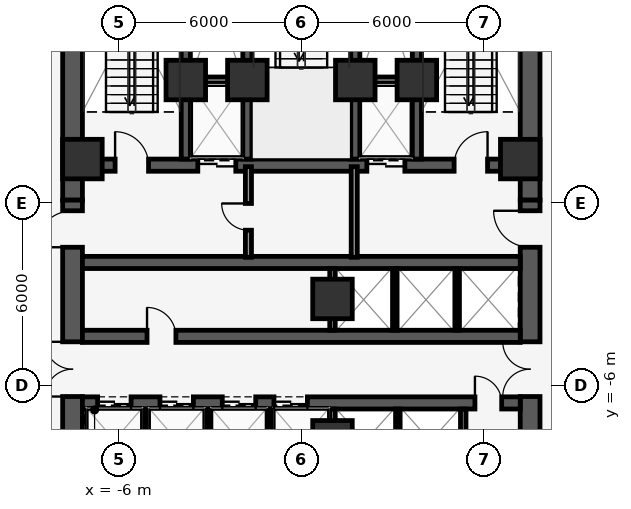
"""IFC4 building model, lengths in metres.
Left out: names, types, materials, properties, quantities, classifications, styles, units other than length and angle.
Written with IfcOpenShell. Run it as: python <this file> out.ifc"""

import sys

from ifc_helpers import new_model, si_unit, direction, frame, frame_2d, origin, origin_2d, place, context, subcontext, project, spatial, rectangle, extrude, element, fill, save


model = new_model("IFC4")
c1 = context("Model", 3, precision=1e-05, world=origin(), true_north=direction((0.0, 1.0)))
c2 = subcontext(c1, "Body", "Model", "MODEL_VIEW")
j1 = project(units=[si_unit("LENGTHUNIT", "METRE"), si_unit("PLANEANGLEUNIT", "RADIAN")], contexts=[c1])
p1 = place(None, origin())
s1 = spatial("IfcSite", under=j1, at=p1, CompositionType="ELEMENT")
p2 = place(p1, origin())
s2 = spatial("IfcBuilding", under=s1, at=p2, CompositionType="ELEMENT")
p3 = place(p2, frame((0.0, 0.0, 152.7)))
s3 = spatial("IfcBuildingStorey", under=s2, at=p3, CompositionType="ELEMENT", Elevation=152.7)
p4 = place(p3, frame((-7.2, 1.25, 0.0), z_axis=(0.0, 0.0, 1.0), x_axis=(1.0, 0.0, 0.0)))
e1 = element("IfcWall", 1, at=p4, inside=s3, PredefinedType="SHEAR", context=c2, shape_type="SweptSolid", body=[
    extrude(rectangle(XDim=14.4, YDim=0.4, at=frame_2d((7.2, 0.0))), origin(), (0.0, 0.0, 1.0), 3.85),
])
p5 = place(p4, frame((3.795, 0.0, 0.0)))
e2 = element("IfcOpeningElement", 2, at=p5, cuts=e1, PredefinedType="OPENING", context=c2, shape_type="SweptSolid", body=[
    extrude(rectangle(XDim=1.25, YDim=2.25, at=frame_2d((0.625, 1.125))), frame((0.0, 0.21, 0.0), z_axis=(0.0, -1.0, 0.0), x_axis=(1.0, 0.0, 0.0)), (0.0, 0.0, 1.0), 0.42),
])
p6 = place(p4, frame((9.355, 0.0, 0.0)))
e3 = element("IfcOpeningElement", 3, at=p6, cuts=e1, PredefinedType="OPENING", context=c2, shape_type="SweptSolid", body=[
    extrude(rectangle(XDim=1.25, YDim=2.25, at=frame_2d((0.625, 1.125))), frame((0.0, 0.21, 0.0), z_axis=(0.0, -1.0, 0.0), x_axis=(1.0, 0.0, 0.0)), (0.0, 0.0, 1.0), 0.42),
])
p7 = place(p4, frame((1.075, 0.0, 0.0)))
e4 = element("IfcOpeningElement", 4, at=p7, cuts=e1, PredefinedType="OPENING", context=c2, shape_type="SweptSolid", body=[
    extrude(rectangle(XDim=1.1, YDim=2.15, at=frame_2d((0.55, 1.075))), frame((0.0, 0.21, 0.0), z_axis=(0.0, -1.0, 0.0), x_axis=(1.0, 0.0, 0.0)), (0.0, 0.0, 1.0), 0.42),
])
p8 = place(p4, frame((12.225, 0.0, 0.0)))
e5 = element("IfcOpeningElement", 5, at=p8, cuts=e1, PredefinedType="OPENING", context=c2, shape_type="SweptSolid", body=[
    extrude(rectangle(XDim=1.1, YDim=2.15, at=frame_2d((0.55, 1.075))), frame((0.0, 0.21, 0.0), z_axis=(0.0, -1.0, 0.0), x_axis=(1.0, 0.0, 0.0)), (0.0, 0.0, 1.0), 0.42),
])
for number, where, z_axis, x_axis in (
    (6, (-3.8, 1.45, 0.0), (0.0, 0.0, 1.0), (0.0, 1.0, 0.0)),
    (7, (-1.775, 1.45, 0.0), (0.0, 0.0, 1.0), (0.0, 1.0, 0.0)),
    (8, (1.775, 1.45, 0.0), (0.0, 0.0, 1.0), (0.0, 1.0, 0.0)),
    (9, (3.8, 1.45, 0.0), (0.0, 0.0, 1.0), (0.0, 1.0, 0.0)),
):
    element("IfcWall", number, at=place(p3, frame(where, z_axis=z_axis, x_axis=x_axis)), inside=s3, PredefinedType="SHEAR", context=c2, shape_type="SweptSolid", body=[
        extrude(rectangle(XDim=7.7, YDim=0.3, at=frame_2d((3.85, 0.0))), origin(), (0.0, 0.0, 1.0), 3.85),
    ])
for number, where, z_axis, x_axis in (
    (10, (-7.525, 0.1, 0.0), (0.0, 0.0, 1.0), (0.0, 1.0, 0.0)),
    (11, (7.525, 0.1, 0.0), (0.0, 0.0, 1.0), (0.0, 1.0, 0.0)),
):
    element("IfcWall", number, at=place(p3, frame(where, z_axis=z_axis, x_axis=x_axis)), inside=s3, PredefinedType="SHEAR", context=c2, shape_type="SweptSolid", body=[
        extrude(rectangle(XDim=9.05, YDim=0.65, at=frame_2d((4.525, 0.0))), origin(), (0.0, 0.0, 1.0), 3.85),
    ])
p9 = place(p3, frame((-7.525, -8.925, 0.0), z_axis=(0.0, 0.0, 1.0), x_axis=(0.0, 1.0, 0.0)))
e12 = element("IfcWall", 12, at=p9, inside=s3, PredefinedType="SHEAR", context=c2, shape_type="SweptSolid", body=[
    extrude(rectangle(XDim=9.025, YDim=0.65, at=frame_2d((4.513, 0.0))), origin(), (0.0, 0.0, 1.0), 3.85),
])
p10 = place(p9, frame((2.565, 0.0, 0.0)))
e13 = element("IfcOpeningElement", 13, at=p10, cuts=e12, PredefinedType="OPENING", context=c2, shape_type="SweptSolid", body=[
    extrude(rectangle(XDim=1.8, YDim=2.2, at=frame_2d((0.9, 1.1))), frame((0.0, 0.335, 0.0), z_axis=(0.0, -1.0, 0.0), x_axis=(1.0, 0.0, 0.0)), (0.0, 0.0, 1.0), 0.67),
])
p11 = place(p9, frame((7.475, 0.0, 0.0)))
e14 = element("IfcOpeningElement", 14, at=p11, cuts=e12, PredefinedType="OPENING", context=c2, shape_type="SweptSolid", body=[
    extrude(rectangle(XDim=1.2, YDim=2.15, at=frame_2d((0.6, 1.075))), frame((0.0, 0.335, 0.0), z_axis=(0.0, -1.0, 0.0), x_axis=(1.0, 0.0, 0.0)), (0.0, 0.0, 1.0), 0.67),
])
p12 = place(p3, frame((7.525, -8.925, 0.0), z_axis=(0.0, 0.0, 1.0), x_axis=(0.0, 1.0, 0.0)))
e15 = element("IfcWall", 15, at=p12, inside=s3, PredefinedType="SHEAR", context=c2, shape_type="SweptSolid", body=[
    extrude(rectangle(XDim=9.025, YDim=0.65, at=frame_2d((4.513, 0.0))), origin(), (0.0, 0.0, 1.0), 3.85),
])
p13 = place(p12, frame((2.565, 0.0, 0.0)))
e16 = element("IfcOpeningElement", 16, at=p13, cuts=e15, PredefinedType="OPENING", context=c2, shape_type="SweptSolid", body=[
    extrude(rectangle(XDim=1.8, YDim=2.2, at=frame_2d((0.9, 1.1))), frame((0.0, 0.335, 0.0), z_axis=(0.0, -1.0, 0.0), x_axis=(1.0, 0.0, 0.0)), (0.0, 0.0, 1.0), 0.67),
])
p14 = place(p12, frame((7.475, 0.0, 0.0)))
e17 = element("IfcOpeningElement", 17, at=p14, cuts=e15, PredefinedType="OPENING", context=c2, shape_type="SweptSolid", body=[
    extrude(rectangle(XDim=1.2, YDim=2.15, at=frame_2d((0.6, 1.075))), frame((0.0, 0.335, 0.0), z_axis=(0.0, -1.0, 0.0), x_axis=(1.0, 0.0, 0.0)), (0.0, 0.0, 1.0), 0.67),
])
p15 = place(p3, frame((-7.2, -1.95, 0.0), z_axis=(0.0, 0.0, 1.0), x_axis=(1.0, 0.0, 0.0)))
e18 = element("IfcWall", 18, at=p15, inside=s3, PredefinedType="SHEAR", context=c2, shape_type="SweptSolid", body=[
    extrude(rectangle(XDim=14.4, YDim=0.4, at=frame_2d((7.2, 0.0))), origin(), (0.0, 0.0, 1.0), 3.85),
])
p16 = place(p3, frame((-7.2, -4.38, 0.0), z_axis=(0.0, 0.0, 1.0), x_axis=(1.0, 0.0, 0.0)))
e19 = element("IfcWall", 19, at=p16, inside=s3, PredefinedType="SHEAR", context=c2, shape_type="SweptSolid", body=[
    extrude(rectangle(XDim=14.4, YDim=0.4, at=frame_2d((7.2, 0.0))), origin(), (0.0, 0.0, 1.0), 3.85),
])
p17 = place(p16, frame((2.125, 0.0, 0.0)))
e20 = element("IfcOpeningElement", 20, at=p17, cuts=e19, PredefinedType="OPENING", context=c2, shape_type="SweptSolid", body=[
    extrude(rectangle(XDim=0.95, YDim=2.15, at=frame_2d((0.475, 1.075))), frame((0.0, 0.21, 0.0), z_axis=(0.0, -1.0, 0.0), x_axis=(1.0, 0.0, 0.0)), (0.0, 0.0, 1.0), 0.42),
])
p18 = place(p3, frame((-7.2, -6.57, 0.0), z_axis=(0.0, 0.0, 1.0), x_axis=(1.0, 0.0, 0.0)))
e21 = element("IfcWall", 21, at=p18, inside=s3, PredefinedType="SHEAR", context=c2, shape_type="SweptSolid", body=[
    extrude(rectangle(XDim=14.4, YDim=0.4, at=frame_2d((7.2, 0.0))), origin(), (0.0, 0.0, 1.0), 3.85),
])
p19 = place(p18, frame((0.5, 0.0, 0.0)))
e22 = element("IfcOpeningElement", 22, at=p19, cuts=e21, PredefinedType="OPENING", context=c2, shape_type="SweptSolid", body=[
    extrude(rectangle(XDim=1.1, YDim=2.2, at=frame_2d((0.55, 1.1))), frame((0.0, 0.21, 0.0), z_axis=(0.0, -1.0, 0.0), x_axis=(1.0, 0.0, 0.0)), (0.0, 0.0, 1.0), 0.42),
])
p20 = place(p18, frame((2.55, 0.0, 0.0)))
e23 = element("IfcOpeningElement", 23, at=p20, cuts=e21, PredefinedType="OPENING", context=c2, shape_type="SweptSolid", body=[
    extrude(rectangle(XDim=1.1, YDim=2.2, at=frame_2d((0.55, 1.1))), frame((0.0, 0.21, 0.0), z_axis=(0.0, -1.0, 0.0), x_axis=(1.0, 0.0, 0.0)), (0.0, 0.0, 1.0), 0.42),
])
p21 = place(p18, frame((4.6, 0.0, 0.0)))
e24 = element("IfcOpeningElement", 24, at=p21, cuts=e21, PredefinedType="OPENING", context=c2, shape_type="SweptSolid", body=[
    extrude(rectangle(XDim=1.1, YDim=2.2, at=frame_2d((0.55, 1.1))), frame((0.0, 0.21, 0.0), z_axis=(0.0, -1.0, 0.0), x_axis=(1.0, 0.0, 0.0)), (0.0, 0.0, 1.0), 0.42),
])
p22 = place(p18, frame((6.3, 0.0, 0.0)))
e25 = element("IfcOpeningElement", 25, at=p22, cuts=e21, PredefinedType="OPENING", context=c2, shape_type="SweptSolid", body=[
    extrude(rectangle(XDim=1.1, YDim=2.2, at=frame_2d((0.55, 1.1))), frame((0.0, 0.21, 0.0), z_axis=(0.0, -1.0, 0.0), x_axis=(1.0, 0.0, 0.0)), (0.0, 0.0, 1.0), 0.42),
])
p23 = place(p18, frame((12.91, 0.0, 0.0)))
e26 = element("IfcOpeningElement", 26, at=p23, cuts=e21, PredefinedType="OPENING", context=c2, shape_type="SweptSolid", body=[
    extrude(rectangle(XDim=0.88, YDim=2.15, at=frame_2d((0.44, 1.075))), frame((0.0, 0.21, 0.0), z_axis=(0.0, -1.0, 0.0), x_axis=(1.0, 0.0, 0.0)), (0.0, 0.0, 1.0), 0.42),
])
for number, where, z_axis, x_axis in (
    (27, (7.2, 1.45, 0.0), (0.0, 0.0, 1.0), (1.0, 0.0, 0.0)),
    (28, (-7.2, 1.45, 0.0), (0.0, 0.0, 1.0), (1.0, 0.0, 0.0)),
    (29, (-3.8, 4.05, 0.0), (0.0, 0.0, 1.0), (1.0, 0.0, 0.0)),
    (30, (3.8, 4.05, 0.0), (0.0, 0.0, 1.0), (1.0, 0.0, 0.0)),
    (31, (-1.775, 4.05, 0.0), (0.0, 0.0, 1.0), (1.0, 0.0, 0.0)),
    (32, (1.775, 4.05, 0.0), (0.0, 0.0, 1.0), (1.0, 0.0, 0.0)),
    (33, (1.025, -3.15, 0.0), (0.0, 0.0, 1.0), (1.0, 0.0, 0.0)),
    (34, (1.025, -7.8, 0.0), (0.0, 0.0, 1.0), (1.0, 0.0, 0.0)),
):
    element("IfcColumn", number, at=place(p3, frame(where, z_axis=z_axis, x_axis=x_axis)), inside=s3, PredefinedType="COLUMN", context=c2, shape_type="SweptSolid", body=[
        extrude(rectangle(XDim=1.3, YDim=1.3, at=origin_2d()), origin(), (0.0, 0.0, 1.0), 4.1),
    ])
p24 = place(p3, frame((-8.762, 34.748, 0.0), z_axis=(0.0, 0.0, 1.0), x_axis=(0.780669916438, -0.624943582708, 0.0)))
e35 = element("IfcWall", 35, at=p24, inside=s3, PredefinedType="STANDARD", context=c2, shape_type="SweptSolid", body=[
    extrude(rectangle(XDim=58.093, YDim=0.3, at=frame_2d((29.046, 0.0))), origin(), (0.0, 0.0, 1.0), 3.85),
])
p25 = place(p24, frame((28.547, 0.0, 0.0)))
e36 = element("IfcOpeningElement", 36, at=p25, cuts=e35, PredefinedType="OPENING", context=c2, shape_type="SweptSolid", body=[
    extrude(rectangle(XDim=1.0, YDim=2.15, at=frame_2d((0.5, 1.075))), frame((0.0, 0.16, 0.0), z_axis=(0.0, -1.0, 0.0), x_axis=(1.0, 0.0, 0.0)), (0.0, 0.0, 1.0), 0.32),
])
p26 = place(p24, frame((5.947, 0.0, 0.85)))
e37 = element("IfcOpeningElement", 37, at=p26, cuts=e35, PredefinedType="OPENING", context=c2, shape_type="SweptSolid", body=[
    extrude(rectangle(XDim=1.4, YDim=2.2, at=frame_2d((0.7, 1.1))), frame((0.0, 0.16, 0.0), z_axis=(0.0, -1.0, 0.0), x_axis=(1.0, 0.0, 0.0)), (0.0, 0.0, 1.0), 0.32),
])
p27 = place(p24, frame((11.547, 0.0, 0.85)))
e38 = element("IfcOpeningElement", 38, at=p27, cuts=e35, PredefinedType="OPENING", context=c2, shape_type="SweptSolid", body=[
    extrude(rectangle(XDim=1.4, YDim=2.2, at=frame_2d((0.7, 1.1))), frame((0.0, 0.16, 0.0), z_axis=(0.0, -1.0, 0.0), x_axis=(1.0, 0.0, 0.0)), (0.0, 0.0, 1.0), 0.32),
])
p28 = place(p24, frame((17.146, 0.0, 0.85)))
e39 = element("IfcOpeningElement", 39, at=p28, cuts=e35, PredefinedType="OPENING", context=c2, shape_type="SweptSolid", body=[
    extrude(rectangle(XDim=1.4, YDim=2.2, at=frame_2d((0.7, 1.1))), frame((0.0, 0.16, 0.0), z_axis=(0.0, -1.0, 0.0), x_axis=(1.0, 0.0, 0.0)), (0.0, 0.0, 1.0), 0.32),
])
p29 = place(p24, frame((22.747, 0.0, 0.85)))
e40 = element("IfcOpeningElement", 40, at=p29, cuts=e35, PredefinedType="OPENING", context=c2, shape_type="SweptSolid", body=[
    extrude(rectangle(XDim=1.4, YDim=2.2, at=frame_2d((0.7, 1.1))), frame((0.0, 0.16, 0.0), z_axis=(0.0, -1.0, 0.0), x_axis=(1.0, 0.0, 0.0)), (0.0, 0.0, 1.0), 0.32),
])
p30 = place(p24, frame((33.947, 0.0, 0.85)))
e41 = element("IfcOpeningElement", 41, at=p30, cuts=e35, PredefinedType="OPENING", context=c2, shape_type="SweptSolid", body=[
    extrude(rectangle(XDim=1.4, YDim=2.2, at=frame_2d((0.7, 1.1))), frame((0.0, 0.16, 0.0), z_axis=(0.0, -1.0, 0.0), x_axis=(1.0, 0.0, 0.0)), (0.0, 0.0, 1.0), 0.32),
])
p31 = place(p24, frame((39.547, 0.0, 0.85)))
e42 = element("IfcOpeningElement", 42, at=p31, cuts=e35, PredefinedType="OPENING", context=c2, shape_type="SweptSolid", body=[
    extrude(rectangle(XDim=1.4, YDim=2.2, at=frame_2d((0.7, 1.1))), frame((0.0, 0.16, 0.0), z_axis=(0.0, -1.0, 0.0), x_axis=(1.0, 0.0, 0.0)), (0.0, 0.0, 1.0), 0.32),
])
p32 = place(p24, frame((45.146, 0.0, 0.85)))
e43 = element("IfcOpeningElement", 43, at=p32, cuts=e35, PredefinedType="OPENING", context=c2, shape_type="SweptSolid", body=[
    extrude(rectangle(XDim=1.4, YDim=2.2, at=frame_2d((0.7, 1.1))), frame((0.0, 0.16, 0.0), z_axis=(0.0, -1.0, 0.0), x_axis=(1.0, 0.0, 0.0)), (0.0, 0.0, 1.0), 0.32),
])
p33 = place(p24, frame((50.747, 0.0, 0.85)))
e44 = element("IfcOpeningElement", 44, at=p33, cuts=e35, PredefinedType="OPENING", context=c2, shape_type="SweptSolid", body=[
    extrude(rectangle(XDim=1.4, YDim=2.2, at=frame_2d((0.7, 1.1))), frame((0.0, 0.16, 0.0), z_axis=(0.0, -1.0, 0.0), x_axis=(1.0, 0.0, 0.0)), (0.0, 0.0, 1.0), 0.32),
])
for number, where, z_axis, x_axis in (
    (45, (-3.65, 4.05, 0.0), (0.0, 0.0, 1.0), (1.0, 0.0, 0.0)),
    (46, (1.92, 4.05, 0.0), (0.0, 0.0, 1.0), (1.0, 0.0, 0.0)),
):
    element("IfcWall", number, at=place(p3, frame(where, z_axis=z_axis, x_axis=x_axis)), inside=s3, PredefinedType="PARTITIONING", context=c2, shape_type="SweptSolid", body=[
        extrude(rectangle(XDim=1.73, YDim=0.2, at=frame_2d((0.865, 0.0))), origin(), (0.0, 0.0, 1.0), 3.85),
    ])
p34 = place(p3, frame((1.025, -4.18, 0.0), z_axis=(0.0, 0.0, 1.0), x_axis=(0.0, 1.0, 0.0)))
e47 = element("IfcWall", 47, at=p34, inside=s3, PredefinedType="PARTITIONING", context=c2, shape_type="SweptSolid", body=[
    extrude(rectangle(XDim=2.03, YDim=0.18, at=frame_2d((1.015, 0.0))), origin(), (0.0, 0.0, 1.0), 2.898),
])
for number, where, z_axis, x_axis in (
    (48, (3.075, -4.18, 0.0), (0.0, 0.0, 1.0), (0.0, 1.0, 0.0)),
    (49, (5.125, -4.18, 0.0), (0.0, 0.0, 1.0), (0.0, 1.0, 0.0)),
):
    element("IfcWall", number, at=place(p3, frame(where, z_axis=z_axis, x_axis=x_axis)), inside=s3, PredefinedType="PARTITIONING", context=c2, shape_type="SweptSolid", body=[
        extrude(rectangle(XDim=2.03, YDim=0.15, at=frame_2d((1.015, 0.0))), origin(), (0.0, 0.0, 1.0), 3.85),
    ])
for number, where, z_axis, x_axis in (
    (50, (-5.125, -8.85, 0.0), (0.0, 0.0, 1.0), (0.0, 1.0, 0.0)),
    (51, (-3.075, -8.85, 0.0), (0.0, 0.0, 1.0), (0.0, 1.0, 0.0)),
    (52, (-1.025, -8.85, 0.0), (0.0, 0.0, 1.0), (0.0, 1.0, 0.0)),
):
    element("IfcWall", number, at=place(p3, frame(where, z_axis=z_axis, x_axis=x_axis)), inside=s3, PredefinedType="PARTITIONING", context=c2, shape_type="SweptSolid", body=[
        extrude(rectangle(XDim=2.08, YDim=0.15, at=frame_2d((1.04, 0.0))), origin(), (0.0, 0.0, 1.0), 3.85),
    ])
p35 = place(p3, frame((1.025, -8.85, 0.0), z_axis=(0.0, 0.0, 1.0), x_axis=(0.0, 1.0, 0.0)))
e53 = element("IfcWall", 53, at=p35, inside=s3, PredefinedType="PARTITIONING", context=c2, shape_type="SweptSolid", body=[
    extrude(rectangle(XDim=2.08, YDim=0.18, at=frame_2d((1.04, 0.0))), origin(), (0.0, 0.0, 1.0), 2.898),
])
p36 = place(p3, frame((3.175, -8.85, 0.0), z_axis=(0.0, 0.0, 1.0), x_axis=(0.0, 1.0, 0.0)))
e54 = element("IfcWall", 54, at=p36, inside=s3, PredefinedType="PARTITIONING", context=c2, shape_type="SweptSolid", body=[
    extrude(rectangle(XDim=2.08, YDim=0.15, at=frame_2d((1.04, 0.0))), origin(), (0.0, 0.0, 1.0), 3.85),
])
p37 = place(p3, frame((5.325, -8.85, 0.0), z_axis=(0.0, 0.0, 1.0), x_axis=(0.0, 1.0, 0.0)))
e55 = element("IfcWall", 55, at=p37, inside=s3, PredefinedType="PARTITIONING", context=c2, shape_type="SweptSolid", body=[
    extrude(rectangle(XDim=2.08, YDim=0.18, at=frame_2d((1.04, 0.0))), origin(), (0.0, 0.0, 1.0), 3.85),
])
p38 = place(p3, frame((-1.74, -1.78, 0.0), z_axis=(0.0, 0.0, 1.0), x_axis=(0.0, 1.0, 0.0)))
e56 = element("IfcWall", 56, at=p38, inside=s3, PredefinedType="PARTITIONING", context=c2, shape_type="SweptSolid", body=[
    extrude(rectangle(XDim=2.98, YDim=0.2, at=frame_2d((1.49, 0.0))), origin(), (0.0, 0.0, 1.0), 3.85),
])
p39 = place(p38, frame((0.89, 0.0, 0.0)))
e57 = element("IfcOpeningElement", 57, at=p39, cuts=e56, PredefinedType="OPENING", context=c2, shape_type="SweptSolid", body=[
    extrude(rectangle(XDim=0.88, YDim=2.15, at=frame_2d((0.44, 1.075))), frame((0.0, 0.11, 0.0), z_axis=(0.0, -1.0, 0.0), x_axis=(1.0, 0.0, 0.0)), (0.0, 0.0, 1.0), 0.22),
])
p40 = place(p3, frame((1.74, -1.78, 0.0), z_axis=(0.0, 0.0, 1.0), x_axis=(0.0, 1.0, 0.0)))
e58 = element("IfcWall", 58, at=p40, inside=s3, PredefinedType="PARTITIONING", context=c2, shape_type="SweptSolid", body=[
    extrude(rectangle(XDim=2.98, YDim=0.2, at=frame_2d((1.49, 0.0))), origin(), (0.0, 0.0, 1.0), 3.85),
])
p41 = place(p19, origin())
e59 = element("IfcDoor", 59, at=p41, inside=s3, OperationType="DOUBLE_DOOR_SLIDING", PredefinedType="DOOR", context=c2, shape_type="SweptSolid", body=[
    extrude(rectangle(XDim=1.1, YDim=2.2, at=frame_2d((0.55, 1.1))), frame((0.0, 0.025, 0.0), z_axis=(0.0, -1.0, 0.0), x_axis=(1.0, 0.0, 0.0)), (0.0, 0.0, 1.0), 0.05),
])
fill(e22, e59)
p42 = place(p20, origin())
e60 = element("IfcDoor", 60, at=p42, inside=s3, OperationType="DOUBLE_DOOR_SLIDING", PredefinedType="DOOR", context=c2, shape_type="SweptSolid", body=[
    extrude(rectangle(XDim=1.1, YDim=2.2, at=frame_2d((0.55, 1.1))), frame((0.0, 0.025, 0.0), z_axis=(0.0, -1.0, 0.0), x_axis=(1.0, 0.0, 0.0)), (0.0, 0.0, 1.0), 0.05),
])
fill(e23, e60)
p43 = place(p21, origin())
e61 = element("IfcDoor", 61, at=p43, inside=s3, OperationType="DOUBLE_DOOR_SLIDING", PredefinedType="DOOR", context=c2, shape_type="SweptSolid", body=[
    extrude(rectangle(XDim=1.1, YDim=2.2, at=frame_2d((0.55, 1.1))), frame((0.0, 0.025, 0.0), z_axis=(0.0, -1.0, 0.0), x_axis=(1.0, 0.0, 0.0)), (0.0, 0.0, 1.0), 0.05),
])
fill(e24, e61)
p44 = place(p22, origin())
e62 = element("IfcDoor", 62, at=p44, inside=s3, OperationType="DOUBLE_DOOR_SLIDING", PredefinedType="DOOR", context=c2, shape_type="SweptSolid", body=[
    extrude(rectangle(XDim=1.1, YDim=2.2, at=frame_2d((0.55, 1.1))), frame((0.0, 0.025, 0.0), z_axis=(0.0, -1.0, 0.0), x_axis=(1.0, 0.0, 0.0)), (0.0, 0.0, 1.0), 0.05),
])
fill(e25, e62)
p45 = place(p5, origin())
e63 = element("IfcDoor", 63, at=p45, inside=s3, OperationType="DOUBLE_DOOR_SLIDING", PredefinedType="DOOR", context=c2, shape_type="SweptSolid", body=[
    extrude(rectangle(XDim=1.25, YDim=2.25, at=frame_2d((0.625, 1.125))), frame((0.0, 0.025, 0.0), z_axis=(0.0, -1.0, 0.0), x_axis=(1.0, 0.0, 0.0)), (0.0, 0.0, 1.0), 0.05),
])
fill(e2, e63)
p46 = place(p6, origin())
e64 = element("IfcDoor", 64, at=p46, inside=s3, OperationType="DOUBLE_DOOR_SLIDING", PredefinedType="DOOR", context=c2, shape_type="SweptSolid", body=[
    extrude(rectangle(XDim=1.25, YDim=2.25, at=frame_2d((0.625, 1.125))), frame((0.0, 0.025, 0.0), z_axis=(0.0, -1.0, 0.0), x_axis=(1.0, 0.0, 0.0)), (0.0, 0.0, 1.0), 0.05),
])
fill(e3, e64)
p47 = place(p7, origin())
e65 = element("IfcDoor", 65, at=p47, inside=s3, OperationType="SINGLE_SWING_LEFT", PredefinedType="DOOR", context=c2, shape_type="SweptSolid", body=[
    extrude(rectangle(XDim=1.1, YDim=2.15, at=frame_2d((0.55, 1.075))), frame((0.0, 0.025, 0.0), z_axis=(0.0, -1.0, 0.0), x_axis=(1.0, 0.0, 0.0)), (0.0, 0.0, 1.0), 0.05),
])
fill(e4, e65)
p48 = place(p8, origin())
e66 = element("IfcDoor", 66, at=p48, inside=s3, OperationType="SINGLE_SWING_RIGHT", PredefinedType="DOOR", context=c2, shape_type="SweptSolid", body=[
    extrude(rectangle(XDim=1.1, YDim=2.15, at=frame_2d((0.55, 1.075))), frame((0.0, 0.025, 0.0), z_axis=(0.0, -1.0, 0.0), x_axis=(1.0, 0.0, 0.0)), (0.0, 0.0, 1.0), 0.05),
])
fill(e5, e66)
p49 = place(p10, origin())
e67 = element("IfcDoor", 67, at=p49, inside=s3, OperationType="DOUBLE_DOOR_SINGLE_SWING", PredefinedType="DOOR", context=c2, shape_type="SweptSolid", body=[
    extrude(rectangle(XDim=1.8, YDim=2.2, at=frame_2d((0.9, 1.1))), frame((0.0, 0.025, 0.0), z_axis=(0.0, -1.0, 0.0), x_axis=(1.0, 0.0, 0.0)), (0.0, 0.0, 1.0), 0.05),
])
fill(e13, e67)
p50 = place(p11, origin())
e68 = element("IfcDoor", 68, at=p50, inside=s3, OperationType="SINGLE_SWING_LEFT", PredefinedType="DOOR", context=c2, shape_type="SweptSolid", body=[
    extrude(rectangle(XDim=1.2, YDim=2.15, at=frame_2d((0.6, 1.075))), frame((0.0, 0.025, 0.0), z_axis=(0.0, -1.0, 0.0), x_axis=(1.0, 0.0, 0.0)), (0.0, 0.0, 1.0), 0.05),
])
fill(e14, e68)
p51 = place(p13, origin())
e69 = element("IfcDoor", 69, at=p51, inside=s3, OperationType="DOUBLE_DOOR_SINGLE_SWING", PredefinedType="DOOR", context=c2, shape_type="SweptSolid", body=[
    extrude(rectangle(XDim=1.8, YDim=2.2, at=frame_2d((0.9, 1.1))), frame((0.0, 0.025, 0.0), z_axis=(0.0, -1.0, 0.0), x_axis=(1.0, 0.0, 0.0)), (0.0, 0.0, 1.0), 0.05),
])
fill(e16, e69)
p52 = place(p14, origin())
e70 = element("IfcDoor", 70, at=p52, inside=s3, OperationType="SINGLE_SWING_RIGHT", PredefinedType="DOOR", context=c2, shape_type="SweptSolid", body=[
    extrude(rectangle(XDim=1.2, YDim=2.15, at=frame_2d((0.6, 1.075))), frame((0.0, 0.025, 0.0), z_axis=(0.0, -1.0, 0.0), x_axis=(1.0, 0.0, 0.0)), (0.0, 0.0, 1.0), 0.05),
])
fill(e17, e70)
p53 = place(p17, origin())
e71 = element("IfcDoor", 71, at=p53, inside=s3, OperationType="SINGLE_SWING_LEFT", PredefinedType="DOOR", context=c2, shape_type="SweptSolid", body=[
    extrude(rectangle(XDim=0.95, YDim=2.15, at=frame_2d((0.475, 1.075))), frame((0.0, 0.025, 0.0), z_axis=(0.0, -1.0, 0.0), x_axis=(1.0, 0.0, 0.0)), (0.0, 0.0, 1.0), 0.05),
])
fill(e20, e71)
p54 = place(p23, origin())
e72 = element("IfcDoor", 72, at=p54, inside=s3, OperationType="SINGLE_SWING_LEFT", PredefinedType="DOOR", context=c2, shape_type="SweptSolid", body=[
    extrude(rectangle(XDim=0.88, YDim=2.15, at=frame_2d((0.44, 1.075))), frame((0.0, 0.025, 0.0), z_axis=(0.0, -1.0, 0.0), x_axis=(1.0, 0.0, 0.0)), (0.0, 0.0, 1.0), 0.05),
])
fill(e26, e72)
p55 = place(p39, origin())
e73 = element("IfcDoor", 73, at=p55, inside=s3, OperationType="SINGLE_SWING_RIGHT", PredefinedType="DOOR", context=c2, shape_type="SweptSolid", body=[
    extrude(rectangle(XDim=0.88, YDim=2.15, at=frame_2d((0.44, 1.075))), frame((0.0, 0.025, 0.0), z_axis=(0.0, -1.0, 0.0), x_axis=(1.0, 0.0, 0.0)), (0.0, 0.0, 1.0), 0.05),
])
fill(e57, e73)
save(model, sys.argv[1])
